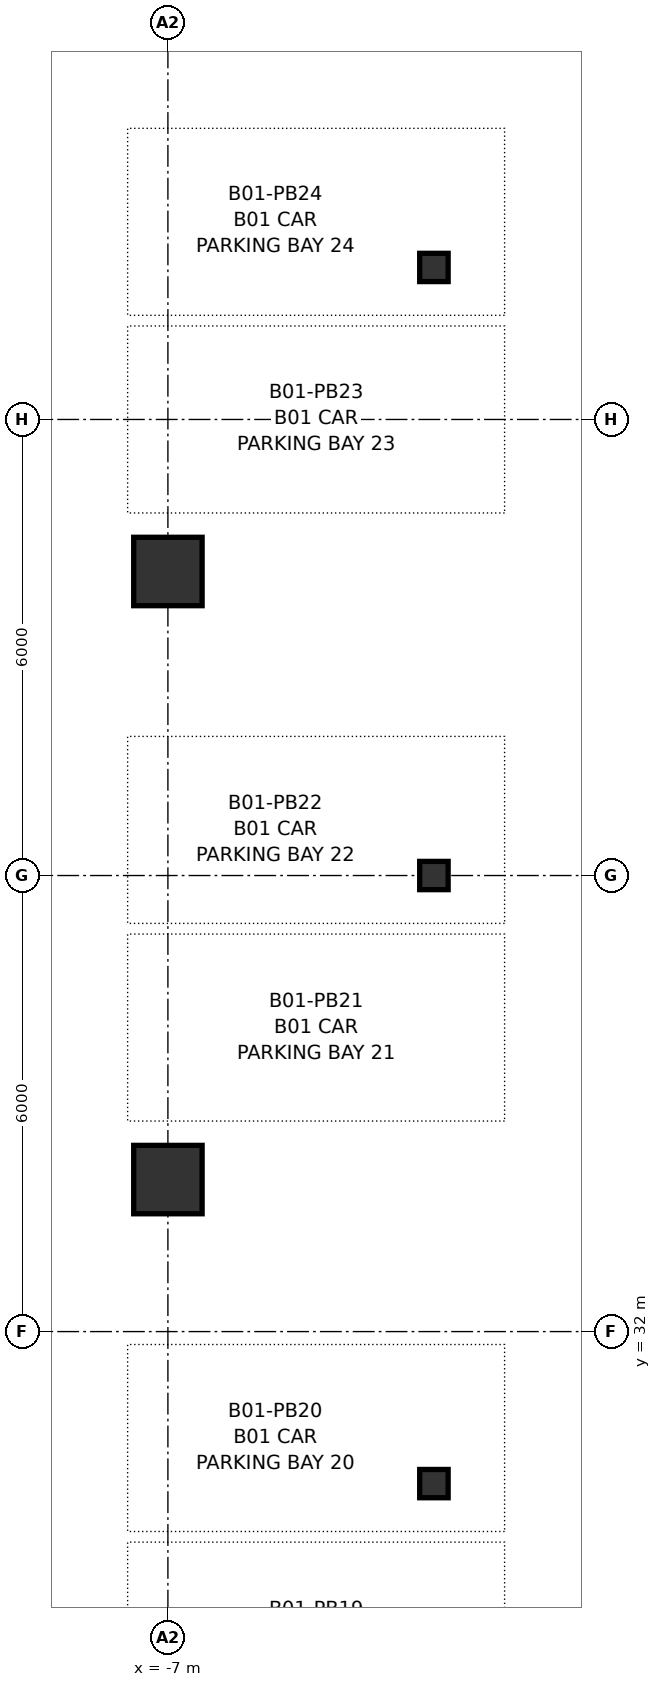
"""IFC4 building model, lengths in metres.
Left out: names, types, materials, properties, quantities, classifications, styles, units other than length and angle.
Written with IfcOpenShell. Run it as: python <this file> out.ifc"""

import sys

from ifc_helpers import new_model, si_unit, direction, frame, origin, origin_2d, place, context, subcontext, project, spatial, rectangle, i_section, extrude, source, transform, mapped, element, save


model = new_model("IFC4")
c1 = context("Model", 3, precision=1e-05, world=origin(), true_north=direction((0.0, 1.0)))
c2 = subcontext(c1, "Body", "Model", "MODEL_VIEW")
j1 = project(units=[si_unit("LENGTHUNIT", "METRE"), si_unit("PLANEANGLEUNIT", "RADIAN")], contexts=[c1])
p1 = place(None, origin())
s1 = spatial("IfcSite", under=j1, at=p1, CompositionType="ELEMENT")
p2 = place(p1, origin())
s2 = spatial("IfcBuilding", under=s1, at=p2, CompositionType="ELEMENT")
p3 = place(p2, frame((0.0, 0.0, -4.2)))
s3 = spatial("IfcBuildingStorey", under=s2, at=p3, CompositionType="ELEMENT", Elevation=-4.2)
m1 = source(origin(), c2, "Body", "SweptSolid", [
    extrude(i_section(OverallWidth=0.374, OverallDepth=0.372, WebThickness=0.016, FlangeThickness=0.026, FilletRadius=0.015, at=origin_2d()), origin(), (0.0, 0.0, 1.0), 3.9),
])
for number, where, z_axis, x_axis in (
    (1, (-3.5, 30.0, 0.0), (0.0, 0.0, 1.0), (1.0, 0.0, 0.0)),
    (2, (-3.5, 38.0, 0.0), (0.0, 0.0, 1.0), (1.0, 0.0, 0.0)),
    (3, (-3.5, 46.0, 0.0), (0.0, 0.0, 1.0), (1.0, 0.0, 0.0)),
):
    element("IfcColumn", number, at=place(p3, frame(where, z_axis=z_axis, x_axis=x_axis)), inside=s3, PredefinedType="PILASTER", context=c2, shape_type="MappedRepresentation", body=[
        mapped(m1, transform((0.0, 0.0, 0.0), x_axis=(1.0, 0.0, 0.0), y_axis=(0.0, 1.0, 0.0), z_axis=(0.0, 0.0, 1.0), scale=1.0)),
    ])
m2 = source(origin(), c2, "Body", "SweptSolid", [
    extrude(rectangle(XDim=0.9, YDim=0.9, at=origin_2d()), origin(), (0.0, 0.0, 1.0), 3.985),
])
for number, where, z_axis, x_axis in (
    (4, (-7.0, 34.0, 0.0), (0.0, 0.0, 1.0), (1.0, 0.0, 0.0)),
    (5, (-7.0, 42.0, 0.0), (0.0, 0.0, 1.0), (1.0, 0.0, 0.0)),
):
    element("IfcColumn", number, at=place(p3, frame(where, z_axis=z_axis, x_axis=x_axis)), inside=s3, PredefinedType="COLUMN", context=c2, shape_type="MappedRepresentation", body=[
        mapped(m2, transform((0.0, 0.0, 0.0), x_axis=(1.0, 0.0, 0.0), y_axis=(0.0, 1.0, 0.0), z_axis=(0.0, 0.0, 1.0), scale=1.0)),
    ])
save(model, sys.argv[1])
